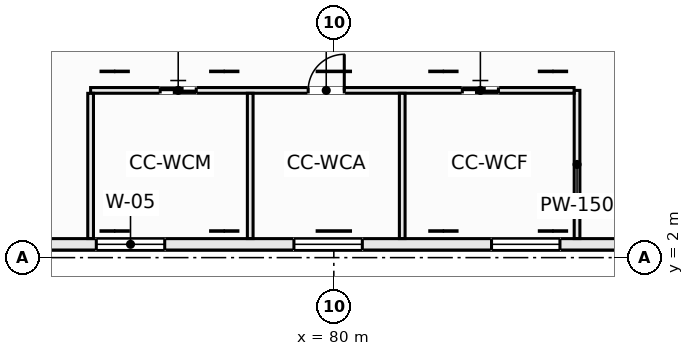
"""IFC4 building model, lengths in metres.
Left out: names, types, materials, properties, quantities, classifications, styles, units other than length and angle.
Written with IfcOpenShell. Run it as: python <this file> out.ifc"""

import sys

from ifc_helpers import new_model, si_unit, direction, frame, frame_2d, origin, place, context, subcontext, project, spatial, rectangle, extrude, element, fill, save


model = new_model("IFC4")
c1 = context("Model", 3, precision=1e-05, world=origin(), true_north=direction((0.0, 1.0)))
c2 = subcontext(c1, "Body", "Model", "MODEL_VIEW")
j1 = project(units=[si_unit("LENGTHUNIT", "METRE"), si_unit("PLANEANGLEUNIT", "RADIAN")], contexts=[c1])
p1 = place(None, origin())
s1 = spatial("IfcSite", under=j1, at=p1, CompositionType="ELEMENT")
p2 = place(p1, origin())
s2 = spatial("IfcBuilding", under=s1, at=p2, CompositionType="ELEMENT")
p3 = place(p2, frame((0.0, 0.0, 21.0)))
s3 = spatial("IfcBuildingStorey", under=s2, at=p3, CompositionType="ELEMENT", Elevation=21.0)
p4 = place(p3, frame((62.35, 2.35, 0.0), z_axis=(0.0, 0.0, 1.0), x_axis=(1.0, 0.0, 0.0)))
e1 = element("IfcWall", 1, at=p4, inside=s3, PredefinedType="SOLIDWALL", context=c2, shape_type="SweptSolid", body=[
    extrude(rectangle(XDim=35.3, YDim=0.3, at=frame_2d((17.65, 0.0))), origin(), (0.0, 0.0, 1.0), 5.25),
])
p5 = place(p4, frame((11.4, 0.0, 0.9)))
e2 = element("IfcOpeningElement", 2, at=p5, cuts=e1, PredefinedType="OPENING", context=c2, shape_type="SweptSolid", body=[
    extrude(rectangle(XDim=1.8, YDim=1.65, at=frame_2d((0.9, 0.825))), frame((0.0, 0.16, 0.0), z_axis=(0.0, -1.0, 0.0), x_axis=(1.0, 0.0, 0.0)), (0.0, 0.0, 1.0), 0.32),
])
p6 = place(p4, frame((16.6, 0.0, 0.9)))
e3 = element("IfcOpeningElement", 3, at=p6, cuts=e1, PredefinedType="OPENING", context=c2, shape_type="SweptSolid", body=[
    extrude(rectangle(XDim=1.8, YDim=1.65, at=frame_2d((0.9, 0.825))), frame((0.0, 0.16, 0.0), z_axis=(0.0, -1.0, 0.0), x_axis=(1.0, 0.0, 0.0)), (0.0, 0.0, 1.0), 0.32),
])
p7 = place(p4, frame((21.8, 0.0, 0.9)))
e4 = element("IfcOpeningElement", 4, at=p7, cuts=e1, PredefinedType="OPENING", context=c2, shape_type="SweptSolid", body=[
    extrude(rectangle(XDim=1.8, YDim=1.65, at=frame_2d((0.9, 0.825))), frame((0.0, 0.16, 0.0), z_axis=(0.0, -1.0, 0.0), x_axis=(1.0, 0.0, 0.0)), (0.0, 0.0, 1.0), 0.32),
])
p8 = place(p3, frame((86.4, 2.502, 0.0), z_axis=(0.0, 0.0, 1.0), x_axis=(0.0, 1.0, 0.0)))
e5 = element("IfcWall", 5, at=p8, inside=s3, PredefinedType="PARTITIONING", context=c2, shape_type="SweptSolid", body=[
    extrude(rectangle(XDim=3.898, YDim=0.15, at=frame_2d((1.949, 0.0))), origin(), (0.0, 0.0, 1.0), 5.25),
])
p9 = place(p3, frame((73.6, 6.4, 0.0), z_axis=(0.0, 0.0, 1.0), x_axis=(1.0, 0.0, 0.0)))
e6 = element("IfcWall", 6, at=p9, inside=s3, PredefinedType="PARTITIONING", context=c2, shape_type="SweptSolid", body=[
    extrude(rectangle(XDim=12.723, YDim=0.15, at=frame_2d((6.361, 0.0))), origin(), (0.0, 0.0, 1.0), 5.25),
])
p10 = place(p9, frame((1.83, 0.0, 0.0)))
e7 = element("IfcOpeningElement", 7, at=p10, cuts=e6, PredefinedType="OPENING", context=c2, shape_type="SweptSolid", body=[
    extrude(rectangle(XDim=0.95, YDim=2.1, at=frame_2d((0.475, 1.05))), frame((0.0, 0.085, 0.0), z_axis=(0.0, -1.0, 0.0), x_axis=(1.0, 0.0, 0.0)), (0.0, 0.0, 1.0), 0.17),
])
p11 = place(p9, frame((5.725, 0.0, 0.0)))
e8 = element("IfcOpeningElement", 8, at=p11, cuts=e6, PredefinedType="OPENING", context=c2, shape_type="SweptSolid", body=[
    extrude(rectangle(XDim=0.95, YDim=2.1, at=frame_2d((0.475, 1.05))), frame((0.0, 0.085, 0.0), z_axis=(0.0, -1.0, 0.0), x_axis=(1.0, 0.0, 0.0)), (0.0, 0.0, 1.0), 0.17),
])
p12 = place(p9, frame((9.781, 0.0, 0.0)))
e9 = element("IfcOpeningElement", 9, at=p12, cuts=e6, PredefinedType="OPENING", context=c2, shape_type="SweptSolid", body=[
    extrude(rectangle(XDim=0.95, YDim=2.1, at=frame_2d((0.475, 1.05))), frame((0.0, 0.085, 0.0), z_axis=(0.0, -1.0, 0.0), x_axis=(1.0, 0.0, 0.0)), (0.0, 0.0, 1.0), 0.17),
])
for number, where, z_axis, x_axis in (
    (10, (73.6, 2.502, 0.0), (0.0, 0.0, 1.0), (0.0, 1.0, 0.0)),
    (11, (77.8, 2.502, 0.0), (0.0, 0.0, 1.0), (0.0, 1.0, 0.0)),
    (12, (81.8, 2.502, 0.0), (0.0, 0.0, 1.0), (0.0, 1.0, 0.0)),
):
    element("IfcWall", number, at=place(p3, frame(where, z_axis=z_axis, x_axis=x_axis)), inside=s3, PredefinedType="PARTITIONING", context=c2, shape_type="SweptSolid", body=[
        extrude(rectangle(XDim=3.821, YDim=0.15, at=frame_2d((1.911, 0.0))), origin(), (0.0, 0.0, 1.0), 5.25),
    ])
p13 = place(p5, origin())
e13 = element("IfcWindow", 13, at=p13, inside=s3, PartitioningType="SINGLE_PANEL", PredefinedType="WINDOW", context=c2, shape_type="SweptSolid", body=[
    extrude(rectangle(XDim=1.8, YDim=1.65, at=frame_2d((0.9, 0.825))), frame((0.0, 0.03, 0.0), z_axis=(0.0, -1.0, 0.0), x_axis=(1.0, 0.0, 0.0)), (0.0, 0.0, 1.0), 0.06),
])
fill(e2, e13)
p14 = place(p6, origin())
e14 = element("IfcWindow", 14, at=p14, inside=s3, PartitioningType="SINGLE_PANEL", PredefinedType="WINDOW", context=c2, shape_type="SweptSolid", body=[
    extrude(rectangle(XDim=1.8, YDim=1.65, at=frame_2d((0.9, 0.825))), frame((0.0, 0.03, 0.0), z_axis=(0.0, -1.0, 0.0), x_axis=(1.0, 0.0, 0.0)), (0.0, 0.0, 1.0), 0.06),
])
fill(e3, e14)
p15 = place(p7, origin())
e15 = element("IfcWindow", 15, at=p15, inside=s3, PartitioningType="SINGLE_PANEL", PredefinedType="WINDOW", context=c2, shape_type="SweptSolid", body=[
    extrude(rectangle(XDim=1.8, YDim=1.65, at=frame_2d((0.9, 0.825))), frame((0.0, 0.03, 0.0), z_axis=(0.0, -1.0, 0.0), x_axis=(1.0, 0.0, 0.0)), (0.0, 0.0, 1.0), 0.06),
])
fill(e4, e15)
p16 = place(p10, origin())
e16 = element("IfcDoor", 16, at=p16, inside=s3, OperationType="SINGLE_SWING_LEFT", PredefinedType="DOOR", context=c2, shape_type="SweptSolid", body=[
    extrude(rectangle(XDim=0.95, YDim=2.1, at=frame_2d((0.475, 1.05))), frame((0.0, 0.025, 0.0), z_axis=(0.0, -1.0, 0.0), x_axis=(1.0, 0.0, 0.0)), (0.0, 0.0, 1.0), 0.05),
])
fill(e7, e16)
p17 = place(p11, origin())
e17 = element("IfcDoor", 17, at=p17, inside=s3, OperationType="SINGLE_SWING_RIGHT", PredefinedType="DOOR", context=c2, shape_type="SweptSolid", body=[
    extrude(rectangle(XDim=0.95, YDim=2.1, at=frame_2d((0.475, 1.05))), frame((0.0, 0.025, 0.0), z_axis=(0.0, -1.0, 0.0), x_axis=(1.0, 0.0, 0.0)), (0.0, 0.0, 1.0), 0.05),
])
fill(e8, e17)
p18 = place(p12, origin())
e18 = element("IfcDoor", 18, at=p18, inside=s3, OperationType="SINGLE_SWING_LEFT", PredefinedType="DOOR", context=c2, shape_type="SweptSolid", body=[
    extrude(rectangle(XDim=0.95, YDim=2.1, at=frame_2d((0.475, 1.05))), frame((0.0, 0.025, 0.0), z_axis=(0.0, -1.0, 0.0), x_axis=(1.0, 0.0, 0.0)), (0.0, 0.0, 1.0), 0.05),
])
fill(e9, e18)
save(model, sys.argv[1])
